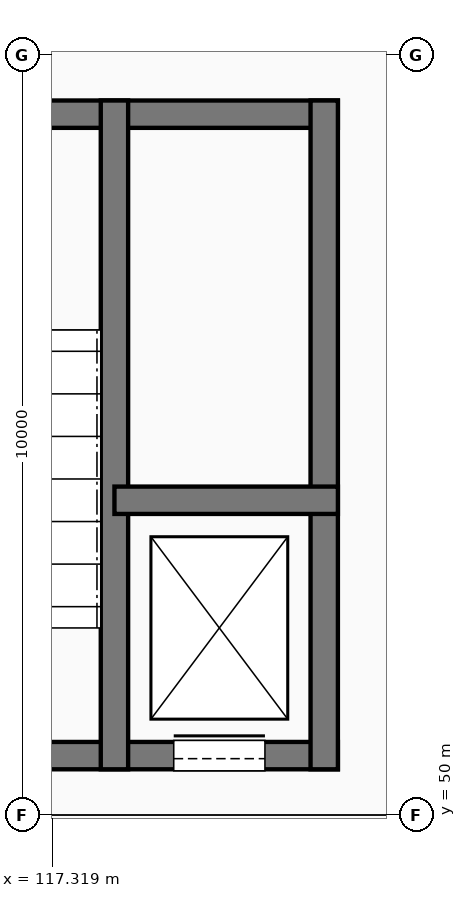
"""IFC4 building model, lengths in metres.
Left out: names, types, materials, properties, quantities, classifications, styles, units other than length and angle.
Written with IfcOpenShell. Run it as: python <this file> out.ifc"""

import sys

from ifc_helpers import new_model, si_unit, direction, frame, frame_2d, origin, place, context, subcontext, project, spatial, rectangle, extrude, element, fill, save


model = new_model("IFC4")
c1 = context("Model", 3, precision=1e-05, world=origin(), true_north=direction((0.0, 1.0)))
c2 = subcontext(c1, "Body", "Model", "MODEL_VIEW")
j1 = project(units=[si_unit("LENGTHUNIT", "METRE"), si_unit("PLANEANGLEUNIT", "RADIAN")], contexts=[c1])
p1 = place(None, origin())
s1 = spatial("IfcSite", under=j1, at=p1, CompositionType="ELEMENT")
p2 = place(p1, origin())
s2 = spatial("IfcBuilding", under=s1, at=p2, CompositionType="ELEMENT")
p3 = place(p2, origin())
s3 = spatial("IfcBuildingStorey", under=s2, at=p3, CompositionType="ELEMENT", Elevation=0.0)
p4 = place(p3, frame((114.4, 50.78, 0.0), z_axis=(0.0, 0.0, 1.0), x_axis=(1.0, 0.0, 0.0)))
e1 = element("IfcWall", 1, at=p4, inside=s3, PredefinedType="SHEAR", context=c2, shape_type="SweptSolid", body=[
    extrude(rectangle(XDim=6.68, YDim=0.36, at=frame_2d((3.34, 0.0))), origin(), (0.0, 0.0, 1.0), 5.4),
])
p5 = place(p4, frame((0.51, 0.0, 0.0)))
e2 = element("IfcOpeningElement", 2, at=p5, cuts=e1, PredefinedType="OPENING", context=c2, shape_type="SweptSolid", body=[
    extrude(rectangle(XDim=1.45, YDim=2.4, at=frame_2d((0.725, 1.2))), frame((0.0, 0.19, 0.0), z_axis=(0.0, -1.0, 0.0), x_axis=(1.0, 0.0, 0.0)), (0.0, 0.0, 1.0), 0.38),
])
p6 = place(p4, frame((4.52, 0.0, 0.0)))
e3 = element("IfcOpeningElement", 3, at=p6, cuts=e1, PredefinedType="OPENING", context=c2, shape_type="SweptSolid", body=[
    extrude(rectangle(XDim=1.2, YDim=2.35, at=frame_2d((0.6, 1.175))), frame((0.0, 0.19, 0.0), z_axis=(0.0, -1.0, 0.0), x_axis=(1.0, 0.0, 0.0)), (0.0, 0.0, 1.0), 0.38),
])
p7 = place(p3, frame((114.4, 59.22, 0.0), z_axis=(0.0, 0.0, 1.0), x_axis=(1.0, 0.0, 0.0)))
e4 = element("IfcWall", 4, at=p7, inside=s3, PredefinedType="SHEAR", context=c2, shape_type="SweptSolid", body=[
    extrude(rectangle(XDim=6.68, YDim=0.36, at=frame_2d((3.34, 0.0))), origin(), (0.0, 0.0, 1.0), 5.4),
])
for number, where, z_axis, x_axis in (
    (5, (120.9, 50.6, 0.0), (0.0, 0.0, 1.0), (0.0, 1.0, 0.0)),
    (6, (118.14, 50.6, 0.0), (0.0, 0.0, 1.0), (0.0, 1.0, 0.0)),
):
    element("IfcWall", number, at=place(p3, frame(where, z_axis=z_axis, x_axis=x_axis)), inside=s3, PredefinedType="SHEAR", context=c2, shape_type="SweptSolid", body=[
        extrude(rectangle(XDim=8.8, YDim=0.36, at=frame_2d((4.4, 0.0))), origin(), (0.0, 0.0, 1.0), 5.4),
    ])
p8 = place(p3, frame((118.14, 54.14, 0.0), z_axis=(0.0, 0.0, 1.0), x_axis=(1.0, 0.0, 0.0)))
e7 = element("IfcWall", 7, at=p8, inside=s3, PredefinedType="SHEAR", context=c2, shape_type="SweptSolid", body=[
    extrude(rectangle(XDim=2.94, YDim=0.36, at=frame_2d((1.47, 0.0))), origin(), (0.0, 0.0, 1.0), 5.4),
])
p9 = place(p6, origin())
e8 = element("IfcDoor", 8, at=p9, inside=s3, OperationType="SLIDING_TO_LEFT", PredefinedType="DOOR", context=c2, shape_type="SweptSolid", body=[
    extrude(rectangle(XDim=1.2, YDim=2.35, at=frame_2d((0.6, 1.175))), frame((0.0, 0.025, 0.0), z_axis=(0.0, -1.0, 0.0), x_axis=(1.0, 0.0, 0.0)), (0.0, 0.0, 1.0), 0.05),
])
fill(e3, e8)
save(model, sys.argv[1])
